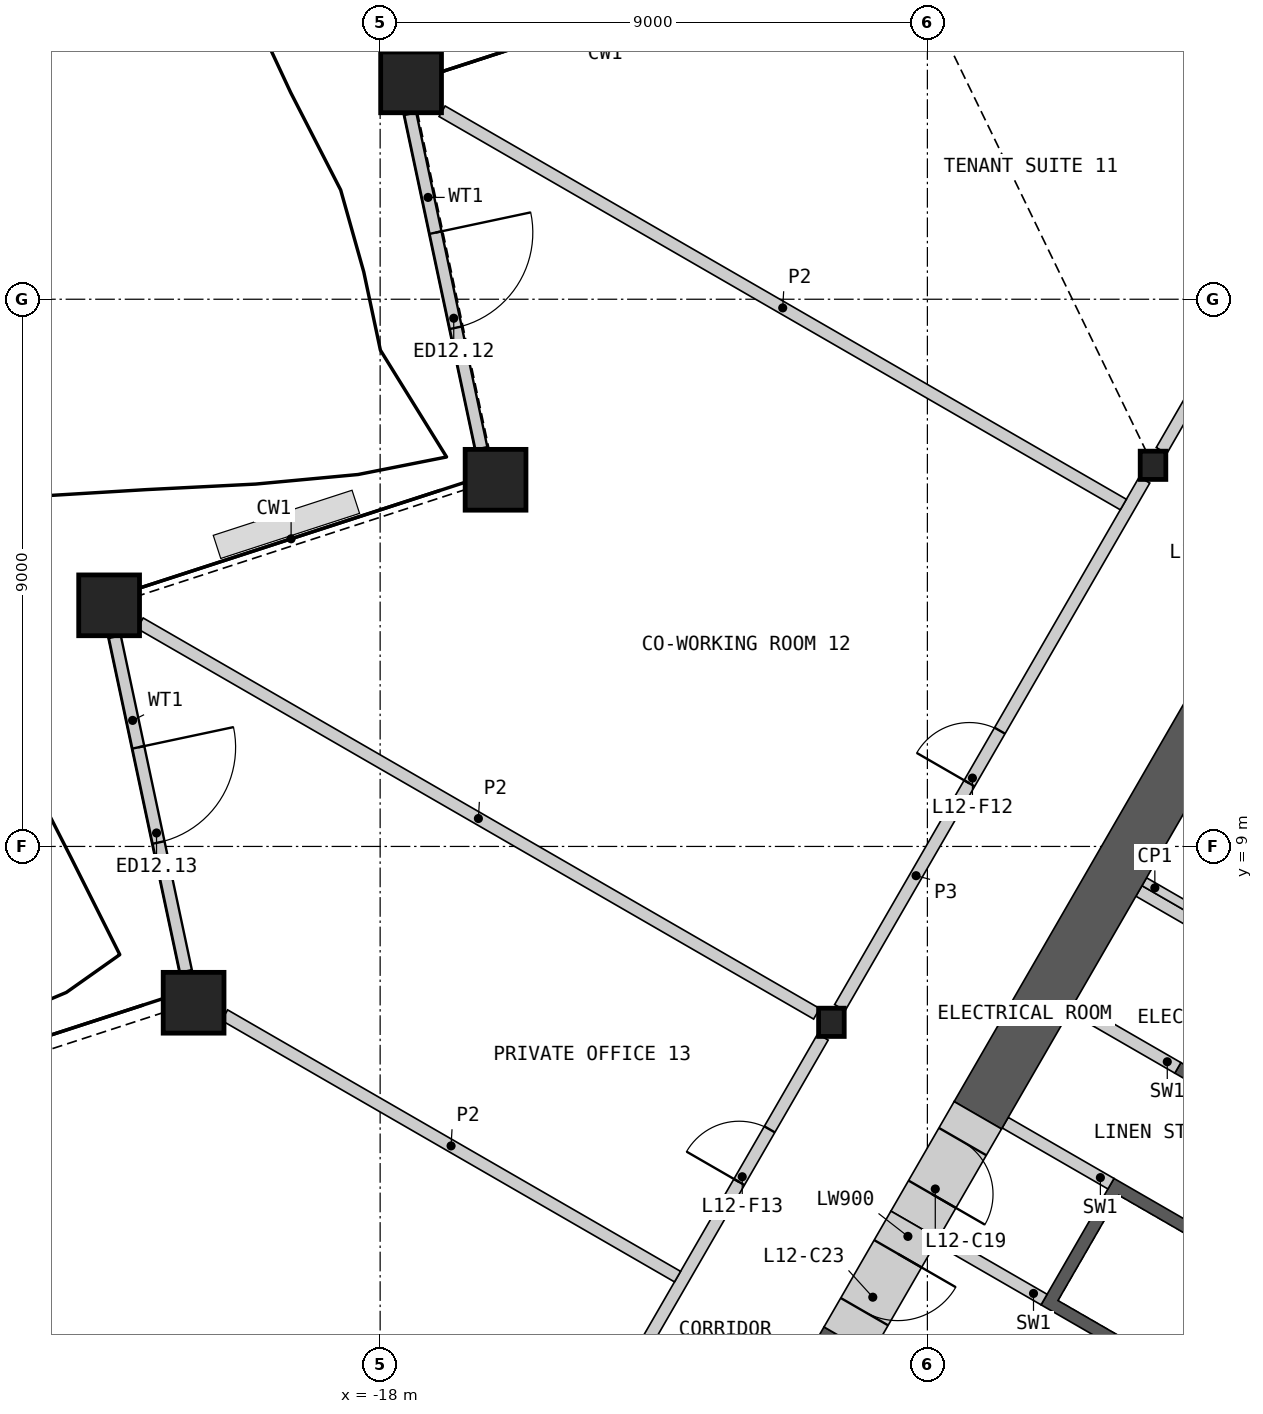
"""IFC4 building model, lengths in metres.
Left out: names, types, materials, properties, quantities, classifications, styles, units other than length and angle.
Written with IfcOpenShell. Run it as: python <this file> out.ifc"""

import sys

from ifc_helpers import new_model, si_unit, direction, frame, frame_2d, origin, origin_2d, place, context, subcontext, project, spatial, polyline, rectangle, hollow_rectangle, i_section, outline, extrude, element, fill, save


model = new_model("IFC4")
c1 = context("Model", 3, precision=1e-05, world=origin(), true_north=direction((0.0, 1.0)))
c2 = subcontext(c1, "Body", "Model", "MODEL_VIEW")
j1 = project(units=[si_unit("LENGTHUNIT", "METRE"), si_unit("PLANEANGLEUNIT", "RADIAN")], contexts=[c1])
p1 = place(None, origin())
s1 = spatial("IfcSite", under=j1, at=p1, CompositionType="ELEMENT")
p2 = place(p1, origin())
s2 = spatial("IfcBuilding", under=s1, at=p2, CompositionType="ELEMENT")
p3 = place(p2, frame((0.0, 0.0, 59.4)))
s3 = spatial("IfcBuildingStorey", under=s2, at=p3, CompositionType="ELEMENT", Elevation=59.4)
for number, where, z_axis, x_axis in (
    (1, (-17.491, 21.567, 0.0), (0.0, 0.0, 1.0), (1.0, 0.0, 0.0)),
    (2, (-16.102, 15.031, 0.0), (0.0, 0.0, 1.0), (1.0, 0.0, 0.0)),
    (3, (-22.457, 12.966, 0.0), (0.0, 0.0, 1.0), (1.0, 0.0, 0.0)),
    (4, (-21.068, 6.429, 0.0), (0.0, 0.0, 1.0), (1.0, 0.0, 0.0)),
):
    element("IfcColumn", number, at=place(p3, frame(where, z_axis=z_axis, x_axis=x_axis)), inside=s3, PredefinedType="COLUMN", context=c2, shape_type="SweptSolid", body=[
        extrude(hollow_rectangle(XDim=1.0, YDim=1.0, WallThickness=0.07, at=origin_2d()), origin(), (0.0, 0.0, 1.0), 4.2),
    ])
for number, where, z_axis, x_axis in (
    (5, (-5.289, 15.269, 0.0), (0.0, 0.0, 1.0), (1.0, 0.0, 0.0)),
    (6, (-10.578, 6.107, 0.0), (0.0, 0.0, 1.0), (1.0, 0.0, 0.0)),
):
    element("IfcColumn", number, at=place(p3, frame(where, z_axis=z_axis, x_axis=x_axis)), inside=s3, PredefinedType="COLUMN", context=c2, shape_type="SweptSolid", body=[
        extrude(i_section(OverallWidth=0.421, OverallDepth=0.465, WebThickness=0.045, FlangeThickness=0.072, at=origin_2d()), origin(), (0.0, 0.0, 1.0), 4.2),
    ])
p4 = place(p3, frame((-17.504, 21.051, 0.0), z_axis=(0.0, 0.0, 1.0), x_axis=(0.207901831982, -0.978149696242, 0.0)))
e7 = element("IfcWall", 7, at=p4, inside=s3, PredefinedType="SOLIDWALL", context=c2, shape_type="SweptSolid", body=[
    extrude(rectangle(XDim=5.626, YDim=0.2, at=frame_2d((2.813, 0.0))), origin(), (0.0, 0.0, 1.0), 3.189),
])
p5 = place(p4, frame((1.998, 0.0, 0.0)))
e8 = element("IfcOpeningElement", 8, at=p5, cuts=e7, PredefinedType="OPENING", context=c2, shape_type="SweptSolid", body=[
    extrude(rectangle(XDim=1.6, YDim=2.4, at=frame_2d((0.8, 1.2))), frame((0.0, 0.11, 0.0), z_axis=(0.0, -1.0, 0.0), x_axis=(1.0, 0.0, 0.0)), (0.0, 0.0, 1.0), 0.22),
])
p6 = place(p3, frame((-22.363, 12.449, 0.0), z_axis=(0.0, 0.0, 1.0), x_axis=(0.207901831982, -0.978149696242, 0.0)))
e9 = element("IfcWall", 9, at=p6, inside=s3, PredefinedType="SOLIDWALL", context=c2, shape_type="SweptSolid", body=[
    extrude(rectangle(XDim=5.626, YDim=0.2, at=frame_2d((2.813, 0.0))), origin(), (0.0, 0.0, 1.0), 3.189),
])
p7 = place(p6, frame((1.86, 0.0, 0.0)))
e10 = element("IfcOpeningElement", 10, at=p7, cuts=e9, PredefinedType="OPENING", context=c2, shape_type="SweptSolid", body=[
    extrude(rectangle(XDim=1.6, YDim=2.4, at=frame_2d((0.8, 1.2))), frame((0.0, 0.11, 0.0), z_axis=(0.0, -1.0, 0.0), x_axis=(1.0, 0.0, 0.0)), (0.0, 0.0, 1.0), 0.22),
])
p8 = place(p3, origin())
e11 = element("IfcWall", 11, at=p8, inside=s3, PredefinedType="SHEAR", context=c2, shape_type="SweptSolid", body=[
    extrude(outline(polyline([(-4.96, 0.208), (-7.131, 1.461), (-5.931, 3.54), (-3.76, 2.287), (-3.861, 2.113), (-5.852, 3.263), (-6.852, 1.531), (-4.861, 0.381), (-4.96, 0.208)])), origin(), (0.0, 0.0, 1.0), 3.8),
])
p9 = place(p3, origin())
e12 = element("IfcWall", 12, at=p9, inside=s3, PredefinedType="SHEAR", context=c2, shape_type="SweptSolid", body=[
    extrude(outline(polyline([(-2.76, 4.019), (-4.931, 5.272), (-4.831, 5.445), (-2.66, 4.192), (-2.76, 4.019)])), origin(), (0.0, 0.0, 1.0), 3.8),
])
p10 = place(p3, frame((-1.631, 5.776, 0.0), z_axis=(0.0, 0.0, 1.0), x_axis=(-0.499992876559, -0.866029516466, 0.0)))
e13 = element("IfcWall", 13, at=p10, inside=s3, PredefinedType="SOLIDWALL", context=c2, shape_type="SweptSolid", body=[
    extrude(rectangle(XDim=6.486, YDim=0.2, at=frame_2d((3.243, 0.0))), origin(), (0.0, 0.0, 1.0), 3.8),
])
p11 = place(p10, frame((0.437, 0.0, 0.0)))
e14 = element("IfcOpeningElement", 14, at=p11, cuts=e13, PredefinedType="OPENING", context=c2, shape_type="SweptSolid", body=[
    extrude(rectangle(XDim=0.9, YDim=2.1, at=frame_2d((0.45, 1.05))), frame((0.0, 0.11, 0.0), z_axis=(0.0, -1.0, 0.0), x_axis=(1.0, 0.0, 0.0)), (0.0, 0.0, 1.0), 0.22),
])
p12 = place(p10, frame((2.637, 0.0, 0.0)))
e15 = element("IfcOpeningElement", 15, at=p12, cuts=e13, PredefinedType="OPENING", context=c2, shape_type="SweptSolid", body=[
    extrude(rectangle(XDim=0.9, YDim=2.1, at=frame_2d((0.45, 1.05))), frame((0.0, 0.11, 0.0), z_axis=(0.0, -1.0, 0.0), x_axis=(1.0, 0.0, 0.0)), (0.0, 0.0, 1.0), 0.22),
])
p13 = place(p3, frame((-3.781, 7.263, 0.0), z_axis=(0.0, 0.0, 1.0), x_axis=(-0.865983199114, 0.50007309351, 0.0)))
e16 = element("IfcWall", 16, at=p13, inside=s3, PredefinedType="SHEAR", context=c2, shape_type="SweptSolid", body=[
    extrude(rectangle(XDim=2.009, YDim=0.2, at=frame_2d((1.004, 0.0))), origin(), (0.0, 0.0, 1.0), 3.8),
])
p14 = place(p3, frame((-4.881, 5.358, 0.0), z_axis=(0.0, 0.0, 1.0), x_axis=(-0.866035824272, 0.499981950752, 0.0)))
e17 = element("IfcWall", 17, at=p14, inside=s3, PredefinedType="SHEAR", context=c2, shape_type="SweptSolid", body=[
    extrude(rectangle(XDim=2.009, YDim=0.2, at=frame_2d((1.004, 0.0))), origin(), (0.0, 0.0, 1.0), 3.8),
])
p15 = place(p3, frame((-5.981, 3.453, 0.0), z_axis=(0.0, 0.0, 1.0), x_axis=(-0.866013584312, 0.500020471368, 0.0)))
e18 = element("IfcWall", 18, at=p15, inside=s3, PredefinedType="SHEAR", context=c2, shape_type="SweptSolid", body=[
    extrude(rectangle(XDim=2.009, YDim=0.2, at=frame_2d((1.005, 0.0))), origin(), (0.0, 0.0, 1.0), 3.8),
])
p16 = place(p3, frame((-7.081, 1.548, 0.0), z_axis=(0.0, 0.0, 1.0), x_axis=(-0.865983199114, 0.50007309351, 0.0)))
e19 = element("IfcWall", 19, at=p16, inside=s3, PredefinedType="SHEAR", context=c2, shape_type="SweptSolid", body=[
    extrude(rectangle(XDim=2.009, YDim=0.2, at=frame_2d((1.004, 0.0))), origin(), (0.0, 0.0, 1.0), 3.8),
])
p17 = place(p3, frame((-3.693, 7.415, 0.0), z_axis=(0.0, 0.0, 1.0), x_axis=(-0.866035824272, 0.499981950752, 0.0)))
e20 = element("IfcWall", 20, at=p17, inside=s3, PredefinedType="PARTITIONING", context=c2, shape_type="SweptSolid", body=[
    extrude(rectangle(XDim=2.009, YDim=0.15, at=frame_2d((1.004, 0.0))), origin(), (0.0, 0.0, 1.0), 3.8),
])
p18 = place(p3, frame((-3.637, 12.43, 0.0), z_axis=(0.0, 0.0, 1.0), x_axis=(-0.500011513458, -0.866018756384, 0.0)))
e21 = element("IfcWall", 21, at=p18, inside=s3, PredefinedType="SHEAR", context=c2, shape_type="SweptSolid", body=[
    extrude(rectangle(XDim=9.066, YDim=0.9, at=frame_2d((4.533, 0.0))), origin(), (0.0, 0.0, 1.0), 3.8),
])
p19 = place(p3, frame((-10.31, 0.872, 0.0), z_axis=(0.0, 0.0, 1.0), x_axis=(-0.499968858743, -0.866043382451, 0.0)))
e22 = element("IfcWall", 22, at=p19, inside=s3, PredefinedType="SHEAR", context=c2, shape_type="SweptSolid", body=[
    extrude(rectangle(XDim=4.546, YDim=0.9, at=frame_2d((2.273, 0.0))), origin(), (0.0, 0.0, 1.0), 3.8),
])
p20 = place(p3, frame((-8.17, 4.579, 0.0), z_axis=(0.0, 0.0, 1.0), x_axis=(-0.499888406853, -0.866089822532, 0.0)))
e23 = element("IfcWall", 23, at=p20, inside=s3, PredefinedType="SHEAR", context=c2, shape_type="SweptSolid", body=[
    extrude(rectangle(XDim=2.08, YDim=0.9, at=frame_2d((1.04, 0.0))), origin(), (0.0, 0.0, 1.0), 3.8),
])
p21 = place(p20, frame((0.5, 0.0, 0.0)))
e24 = element("IfcOpeningElement", 24, at=p21, cuts=e23, PredefinedType="OPENING", context=c2, shape_type="SweptSolid", body=[
    extrude(rectangle(XDim=1.0, YDim=2.1, at=frame_2d((0.5, 1.05))), frame((0.0, 0.46, 0.0), z_axis=(0.0, -1.0, 0.0), x_axis=(1.0, 0.0, 0.0)), (0.0, 0.0, 1.0), 0.92),
])
p22 = place(p3, frame((-9.21, 2.777, 0.0), z_axis=(0.0, 0.0, 1.0), x_axis=(-0.500077893725, -0.86598042715, 0.0)))
e25 = element("IfcWall", 25, at=p22, inside=s3, PredefinedType="SHEAR", context=c2, shape_type="SweptSolid", body=[
    extrude(rectangle(XDim=2.2, YDim=0.9, at=frame_2d((1.1, 0.0))), origin(), (0.0, 0.0, 1.0), 3.8),
])
p23 = place(p22, frame((0.55, 0.0, 0.0)))
e26 = element("IfcOpeningElement", 26, at=p23, cuts=e25, PredefinedType="OPENING", context=c2, shape_type="SweptSolid", body=[
    extrude(rectangle(XDim=1.1, YDim=2.1, at=frame_2d((0.55, 1.05))), frame((0.0, 0.46, 0.0), z_axis=(0.0, -1.0, 0.0), x_axis=(1.0, 0.0, 0.0)), (0.0, 0.0, 1.0), 0.92),
])
p24 = place(p3, frame((-10.439, 6.35, 0.0), z_axis=(0.0, 0.0, 1.0), x_axis=(0.50001002959, 0.86601961312, 0.0)))
e27 = element("IfcWall", 27, at=p24, inside=s3, PredefinedType="PARTITIONING", context=c2, shape_type="SweptSolid", body=[
    extrude(rectangle(XDim=10.019, YDim=0.2, at=frame_2d((5.009, 0.0))), origin(), (0.0, 0.0, 1.0), 3.8),
])
p25 = place(p24, frame((4.259, 0.0, 0.0)))
e28 = element("IfcOpeningElement", 28, at=p25, cuts=e27, PredefinedType="OPENING", context=c2, shape_type="SweptSolid", body=[
    extrude(rectangle(XDim=1.0, YDim=2.1, at=frame_2d((0.5, 1.05))), frame((0.0, 0.11, 0.0), z_axis=(0.0, -1.0, 0.0), x_axis=(1.0, 0.0, 0.0)), (0.0, 0.0, 1.0), 0.22),
])
p26 = place(p3, frame((-15.728, -2.811, 0.0), z_axis=(0.0, 0.0, 1.0), x_axis=(0.49999175339, 0.866030164915, 0.0)))
e29 = element("IfcWall", 29, at=p26, inside=s3, PredefinedType="PARTITIONING", context=c2, shape_type="SweptSolid", body=[
    extrude(rectangle(XDim=10.019, YDim=0.2, at=frame_2d((5.009, 0.0))), origin(), (0.0, 0.0, 1.0), 3.8),
])
p27 = place(p26, frame((7.266, 0.0, 0.0)))
e30 = element("IfcOpeningElement", 30, at=p27, cuts=e29, PredefinedType="OPENING", context=c2, shape_type="SweptSolid", body=[
    extrude(rectangle(XDim=1.0, YDim=2.1, at=frame_2d((0.5, 1.05))), frame((0.0, 0.11, 0.0), z_axis=(0.0, -1.0, 0.0), x_axis=(1.0, 0.0, 0.0)), (0.0, 0.0, 1.0), 0.22),
])
p28 = place(p3, frame((-5.149, 15.511, 0.0), z_axis=(0.0, 0.0, 1.0), x_axis=(0.500001069878, 0.866024786089, 0.0)))
e31 = element("IfcWall", 31, at=p28, inside=s3, PredefinedType="PARTITIONING", context=c2, shape_type="SweptSolid", body=[
    extrude(rectangle(XDim=6.473, YDim=0.2, at=frame_2d((3.236, 0.0))), origin(), (0.0, 0.0, 1.0), 3.8),
])
p29 = place(p28, frame((2.686, 0.0, 0.0)))
e32 = element("IfcOpeningElement", 32, at=p29, cuts=e31, PredefinedType="OPENING", context=c2, shape_type="SweptSolid", body=[
    extrude(rectangle(XDim=1.0, YDim=2.1, at=frame_2d((0.5, 1.05))), frame((0.0, 0.11, 0.0), z_axis=(0.0, -1.0, 0.0), x_axis=(1.0, 0.0, 0.0)), (0.0, 0.0, 1.0), 0.22),
])
p30 = place(p3, frame((-12.445, 29.659, 0.0), z_axis=(0.0, 0.0, 1.0), x_axis=(0.772048928551, -0.635563098302, 0.0)))
e33 = element("IfcWall", 33, at=p30, inside=s3, PredefinedType="PARTITIONING", context=c2, shape_type="SweptSolid", body=[
    extrude(rectangle(XDim=13.477, YDim=0.2, at=frame_2d((6.738, 0.0))), origin(), (0.0, 0.0, 1.0), 2.885),
])
p31 = place(p3, frame((-16.981, 21.092, 0.0), z_axis=(0.0, 0.0, 1.0), x_axis=(0.866026884493, -0.499997435328, 0.0)))
e34 = element("IfcWall", 34, at=p31, inside=s3, PredefinedType="PARTITIONING", context=c2, shape_type="SweptSolid", body=[
    extrude(rectangle(XDim=12.937, YDim=0.2, at=frame_2d((6.469, 0.0))), origin(), (0.0, 0.0, 1.0), 2.885),
])
p32 = place(p3, frame((-21.947, 12.671, 0.0), z_axis=(0.0, 0.0, 1.0), x_axis=(0.866026729935, -0.499997703033, 0.0)))
e35 = element("IfcWall", 35, at=p32, inside=s3, PredefinedType="PARTITIONING", context=c2, shape_type="SweptSolid", body=[
    extrude(rectangle(XDim=12.848, YDim=0.2, at=frame_2d((6.424, 0.0))), origin(), (0.0, 0.0, 1.0), 2.885),
])
p33 = place(p3, frame((-20.558, 6.225, 0.0), z_axis=(0.0, 0.0, 1.0), x_axis=(0.866031967744, -0.499988630717, 0.0)))
e36 = element("IfcWall", 36, at=p33, inside=s3, PredefinedType="PARTITIONING", context=c2, shape_type="SweptSolid", body=[
    extrude(rectangle(XDim=8.601, YDim=0.2, at=frame_2d((4.301, 0.0))), origin(), (0.0, 0.0, 1.0), 2.885),
])
p34 = place(p5, origin())
e37 = element("IfcDoor", 37, at=p34, inside=s3, OperationType="DOUBLE_DOOR_SINGLE_SWING", PredefinedType="DOOR", context=c2, shape_type="SweptSolid", body=[
    extrude(rectangle(XDim=1.6, YDim=2.4, at=frame_2d((0.8, 1.2))), frame((0.0, 0.025, 0.0), z_axis=(0.0, -1.0, 0.0), x_axis=(1.0, 0.0, 0.0)), (0.0, 0.0, 1.0), 0.05),
])
fill(e8, e37)
p35 = place(p7, origin())
e38 = element("IfcDoor", 38, at=p35, inside=s3, OperationType="DOUBLE_DOOR_SINGLE_SWING", PredefinedType="DOOR", context=c2, shape_type="SweptSolid", body=[
    extrude(rectangle(XDim=1.6, YDim=2.4, at=frame_2d((0.8, 1.2))), frame((0.0, 0.025, 0.0), z_axis=(0.0, -1.0, 0.0), x_axis=(1.0, 0.0, 0.0)), (0.0, 0.0, 1.0), 0.05),
])
fill(e10, e38)
p36 = place(p21, origin())
e39 = element("IfcDoor", 39, at=p36, inside=s3, OperationType="SINGLE_SWING_RIGHT", PredefinedType="DOOR", context=c2, shape_type="SweptSolid", body=[
    extrude(rectangle(XDim=1.0, YDim=2.1, at=frame_2d((0.5, 1.05))), frame((0.0, 0.205, 0.0), z_axis=(0.0, -1.0, 0.0), x_axis=(1.0, 0.0, 0.0)), (0.0, 0.0, 1.0), 0.05),
])
fill(e24, e39)
p37 = place(p23, origin())
e40 = element("IfcDoor", 40, at=p37, inside=s3, OperationType="SINGLE_SWING_LEFT", PredefinedType="DOOR", context=c2, shape_type="SweptSolid", body=[
    extrude(rectangle(XDim=1.1, YDim=2.1, at=frame_2d((0.55, 1.05))), frame((0.0, 0.205, 0.0), z_axis=(0.0, -1.0, 0.0), x_axis=(1.0, 0.0, 0.0)), (0.0, 0.0, 1.0), 0.05),
])
fill(e26, e40)
p38 = place(p25, origin())
e41 = element("IfcDoor", 41, at=p38, inside=s3, OperationType="SINGLE_SWING_LEFT", PredefinedType="DOOR", context=c2, shape_type="SweptSolid", body=[
    extrude(rectangle(XDim=1.0, YDim=2.1, at=frame_2d((0.5, 1.05))), frame((0.0, 0.025, 0.0), z_axis=(0.0, -1.0, 0.0), x_axis=(1.0, 0.0, 0.0)), (0.0, 0.0, 1.0), 0.05),
])
fill(e28, e41)
p39 = place(p27, origin())
e42 = element("IfcDoor", 42, at=p39, inside=s3, OperationType="SINGLE_SWING_LEFT", PredefinedType="DOOR", context=c2, shape_type="SweptSolid", body=[
    extrude(rectangle(XDim=1.0, YDim=2.1, at=frame_2d((0.5, 1.05))), frame((0.0, 0.025, 0.0), z_axis=(0.0, -1.0, 0.0), x_axis=(1.0, 0.0, 0.0)), (0.0, 0.0, 1.0), 0.05),
])
fill(e30, e42)
save(model, sys.argv[1])
